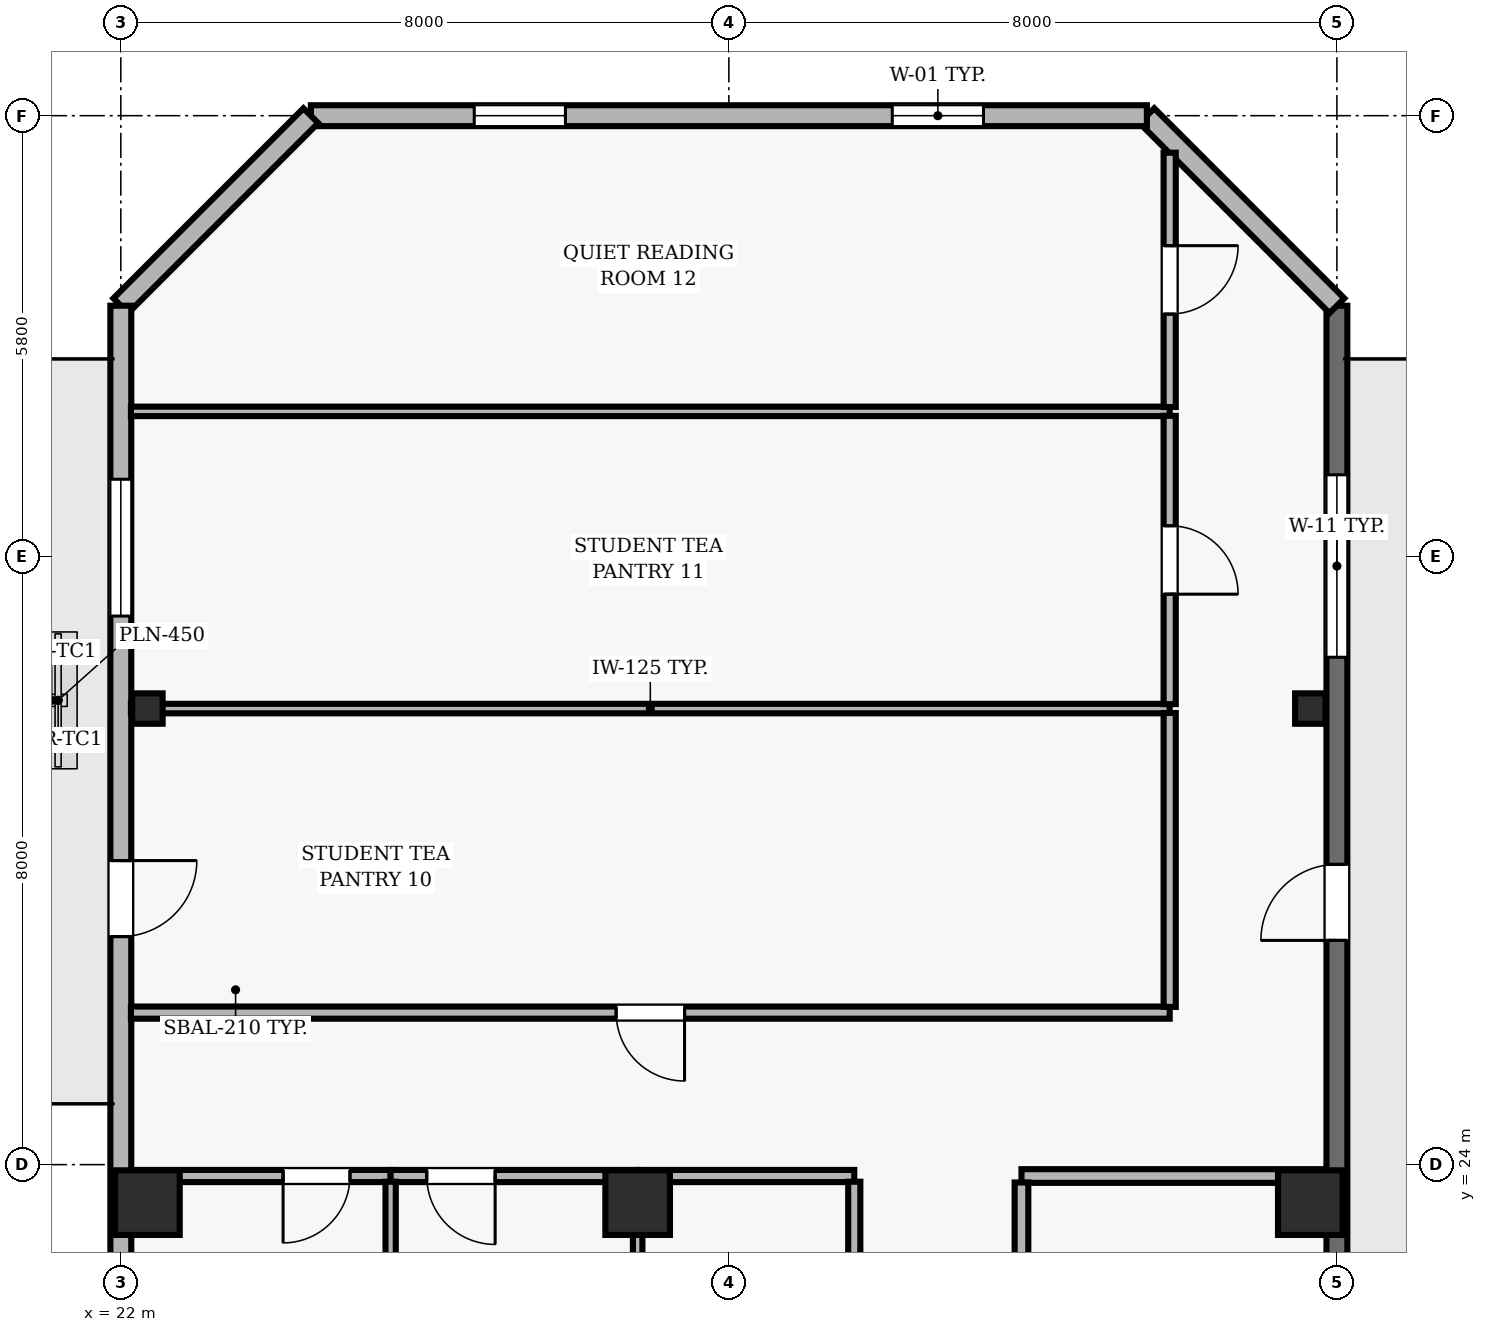
"""IFC4 building model, lengths in metres.
Left out: names, types, materials, properties, quantities, classifications, styles, units other than length and angle.
Written with IfcOpenShell. Run it as: python <this file> out.ifc"""

import sys

from ifc_helpers import new_model, si_unit, direction, frame, frame_2d, origin, origin_2d, place, context, subcontext, project, spatial, rectangle, hollow_rectangle, extrude, element, fill, save


model = new_model("IFC4")
c1 = context("Model", 3, precision=1e-05, world=origin(), true_north=direction((0.0, 1.0)))
c2 = subcontext(c1, "Body", "Model", "MODEL_VIEW")
j1 = project(units=[si_unit("LENGTHUNIT", "METRE"), si_unit("PLANEANGLEUNIT", "RADIAN")], contexts=[c1])
p1 = place(None, origin())
s1 = spatial("IfcSite", under=j1, at=p1, CompositionType="ELEMENT")
p2 = place(p1, origin())
s2 = spatial("IfcBuilding", under=s1, at=p2, CompositionType="ELEMENT")
p3 = place(p2, frame((0.0, 0.0, 302.8)))
s3 = spatial("IfcBuildingStorey", under=s2, at=p3, CompositionType="ELEMENT", Elevation=302.8)
for number, where, z_axis, x_axis in (
    (1, (22.35, 23.5, 0.0), (0.0, 0.0, 1.0), (1.0, 0.0, 0.0)),
    (2, (28.8, 23.5, 0.0), (0.0, 0.0, 1.0), (1.0, 0.0, 0.0)),
    (3, (37.65, 23.5, 0.0), (0.0, 0.0, 1.0), (1.0, 0.0, 0.0)),
):
    element("IfcColumn", number, at=place(p3, frame(where, z_axis=z_axis, x_axis=x_axis)), inside=s3, PredefinedType="COLUMN", context=c2, shape_type="SweptSolid", body=[
        extrude(rectangle(XDim=0.85, YDim=0.85, at=origin_2d()), origin(), (0.0, 0.0, 1.0), 3.9),
    ])
for number, where, z_axis, x_axis in (
    (4, (22.35, 30.0, 0.0), (0.0, 0.0, 1.0), (1.0, 0.0, 0.0)),
    (5, (37.65, 30.0, 0.0), (0.0, 0.0, 1.0), (1.0, 0.0, 0.0)),
):
    element("IfcColumn", number, at=place(p3, frame(where, z_axis=z_axis, x_axis=x_axis)), inside=s3, PredefinedType="COLUMN", context=c2, shape_type="SweptSolid", body=[
        extrude(hollow_rectangle(XDim=0.4, YDim=0.4, WallThickness=0.02, at=origin_2d()), origin(), (0.0, 0.0, 1.0), 3.9),
    ])
p4 = place(p3, frame((38.0, 21.6, 0.0), z_axis=(0.0, 0.0, 1.0), x_axis=(0.0, 1.0, 0.0)))
e6 = element("IfcWall", 6, at=p4, inside=s3, PredefinedType="SOLIDWALL", context=c2, shape_type="SweptSolid", body=[
    extrude(rectangle(XDim=13.7, YDim=0.275, at=frame_2d((6.85, 0.0))), origin(), (0.0, 0.0, 1.0), 3.64),
])
p5 = place(p4, frame((5.35, 0.0, 0.0)))
e7 = element("IfcOpeningElement", 7, at=p5, cuts=e6, PredefinedType="OPENING", context=c2, shape_type="SweptSolid", body=[
    extrude(rectangle(XDim=1.0, YDim=2.2, at=frame_2d((0.5, 1.1))), frame((0.0, 0.147, 0.0), z_axis=(0.0, -1.0, 0.0), x_axis=(1.0, 0.0, 0.0)), (0.0, 0.0, 1.0), 0.295),
])
p6 = place(p4, frame((9.075, 0.0, 0.9)))
e8 = element("IfcOpeningElement", 8, at=p6, cuts=e6, PredefinedType="OPENING", context=c2, shape_type="SweptSolid", body=[
    extrude(rectangle(XDim=2.4, YDim=2.2, at=frame_2d((1.2, 1.1))), frame((0.0, 0.147, 0.0), z_axis=(0.0, -1.0, 0.0), x_axis=(1.0, 0.0, 0.0)), (0.0, 0.0, 1.0), 0.295),
])
p7 = place(p3, frame((38.0, 35.3, 0.0), z_axis=(0.0, 0.0, 1.0), x_axis=(-0.707106781187, 0.707106781187, 0.0)))
e9 = element("IfcWall", 9, at=p7, inside=s3, PredefinedType="SOLIDWALL", context=c2, shape_type="SweptSolid", body=[
    extrude(rectangle(XDim=3.536, YDim=0.275, at=frame_2d((1.768, 0.0))), origin(), (0.0, 0.0, 1.0), 3.64),
])
p8 = place(p3, frame((35.5, 37.8, 0.0), z_axis=(0.0, 0.0, 1.0), x_axis=(-1.0, 0.0, 0.0)))
e10 = element("IfcWall", 10, at=p8, inside=s3, PredefinedType="SOLIDWALL", context=c2, shape_type="SweptSolid", body=[
    extrude(rectangle(XDim=11.0, YDim=0.275, at=frame_2d((5.5, 0.0))), origin(), (0.0, 0.0, 1.0), 3.64),
])
p9 = place(p8, frame((2.15, 0.0, 0.9)))
e11 = element("IfcOpeningElement", 11, at=p9, cuts=e10, PredefinedType="OPENING", context=c2, shape_type="SweptSolid", body=[
    extrude(rectangle(XDim=1.2, YDim=1.6, at=frame_2d((0.6, 0.8))), frame((0.0, 0.147, 0.0), z_axis=(0.0, -1.0, 0.0), x_axis=(1.0, 0.0, 0.0)), (0.0, 0.0, 1.0), 0.295),
])
p10 = place(p8, frame((7.65, 0.0, 0.9)))
e12 = element("IfcOpeningElement", 12, at=p10, cuts=e10, PredefinedType="OPENING", context=c2, shape_type="SweptSolid", body=[
    extrude(rectangle(XDim=1.2, YDim=1.6, at=frame_2d((0.6, 0.8))), frame((0.0, 0.147, 0.0), z_axis=(0.0, -1.0, 0.0), x_axis=(1.0, 0.0, 0.0)), (0.0, 0.0, 1.0), 0.295),
])
p11 = place(p3, frame((24.5, 37.8, 0.0), z_axis=(0.0, 0.0, 1.0), x_axis=(-0.707106781187, -0.707106781187, 0.0)))
e13 = element("IfcWall", 13, at=p11, inside=s3, PredefinedType="SOLIDWALL", context=c2, shape_type="SweptSolid", body=[
    extrude(rectangle(XDim=3.536, YDim=0.275, at=frame_2d((1.768, 0.0))), origin(), (0.0, 0.0, 1.0), 3.64),
])
p12 = place(p3, frame((22.0, 35.3, 0.0), z_axis=(0.0, 0.0, 1.0), x_axis=(0.0, -1.0, 0.0)))
e14 = element("IfcWall", 14, at=p12, inside=s3, PredefinedType="SOLIDWALL", context=c2, shape_type="SweptSolid", body=[
    extrude(rectangle(XDim=32.8, YDim=0.275, at=frame_2d((16.4, 0.0))), origin(), (0.0, 0.0, 1.0), 3.64),
])
p13 = place(p12, frame((7.3, 0.0, 0.0)))
e15 = element("IfcOpeningElement", 15, at=p13, cuts=e14, PredefinedType="OPENING", context=c2, shape_type="SweptSolid", body=[
    extrude(rectangle(XDim=1.0, YDim=2.2, at=frame_2d((0.5, 1.1))), frame((0.0, 0.147, 0.0), z_axis=(0.0, -1.0, 0.0), x_axis=(1.0, 0.0, 0.0)), (0.0, 0.0, 1.0), 0.295),
])
p14 = place(p12, frame((2.283, 0.0, 0.9)))
e16 = element("IfcOpeningElement", 16, at=p14, cuts=e14, PredefinedType="OPENING", context=c2, shape_type="SweptSolid", body=[
    extrude(rectangle(XDim=1.8, YDim=1.6, at=frame_2d((0.9, 0.8))), frame((0.0, 0.147, 0.0), z_axis=(0.0, -1.0, 0.0), x_axis=(1.0, 0.0, 0.0)), (0.0, 0.0, 1.0), 0.295),
])
p15 = place(p12, frame((12.767, 0.0, 0.9)))
e17 = element("IfcOpeningElement", 17, at=p15, cuts=e14, PredefinedType="OPENING", context=c2, shape_type="SweptSolid", body=[
    extrude(rectangle(XDim=1.8, YDim=1.6, at=frame_2d((0.9, 0.8))), frame((0.0, 0.147, 0.0), z_axis=(0.0, -1.0, 0.0), x_axis=(1.0, 0.0, 0.0)), (0.0, 0.0, 1.0), 0.295),
])
p16 = place(p12, frame((18.233, 0.0, 0.9)))
e18 = element("IfcOpeningElement", 18, at=p16, cuts=e14, PredefinedType="OPENING", context=c2, shape_type="SweptSolid", body=[
    extrude(rectangle(XDim=1.8, YDim=1.6, at=frame_2d((0.9, 0.8))), frame((0.0, 0.147, 0.0), z_axis=(0.0, -1.0, 0.0), x_axis=(1.0, 0.0, 0.0)), (0.0, 0.0, 1.0), 0.295),
])
p17 = place(p12, frame((23.7, 0.0, 0.9)))
e19 = element("IfcOpeningElement", 19, at=p17, cuts=e14, PredefinedType="OPENING", context=c2, shape_type="SweptSolid", body=[
    extrude(rectangle(XDim=1.8, YDim=1.6, at=frame_2d((0.9, 0.8))), frame((0.0, 0.147, 0.0), z_axis=(0.0, -1.0, 0.0), x_axis=(1.0, 0.0, 0.0)), (0.0, 0.0, 1.0), 0.295),
])
p18 = place(p3, frame((25.55, 23.85, 0.0), z_axis=(0.0, 0.0, 1.0), x_axis=(-1.0, 0.0, 0.0)))
e20 = element("IfcWall", 20, at=p18, inside=s3, PredefinedType="PARTITIONING", context=c2, shape_type="SweptSolid", body=[
    extrude(rectangle(XDim=3.35, YDim=0.16, at=frame_2d((1.675, 0.0))), origin(), (0.0, 0.0, 1.0), 3.171),
])
p19 = place(p18, frame((0.535, 0.0, 0.0)))
e21 = element("IfcOpeningElement", 21, at=p19, cuts=e20, PredefinedType="OPENING", context=c2, shape_type="SweptSolid", body=[
    extrude(rectangle(XDim=0.88, YDim=2.1, at=frame_2d((0.44, 1.05))), frame((0.0, 0.09, 0.0), z_axis=(0.0, -1.0, 0.0), x_axis=(1.0, 0.0, 0.0)), (0.0, 0.0, 1.0), 0.18),
])
p20 = place(p3, frame((28.8, 23.85, 0.0), z_axis=(0.0, 0.0, 1.0), x_axis=(-1.0, 0.0, 0.0)))
e22 = element("IfcWall", 22, at=p20, inside=s3, PredefinedType="PARTITIONING", context=c2, shape_type="SweptSolid", body=[
    extrude(rectangle(XDim=3.25, YDim=0.16, at=frame_2d((1.625, 0.0))), origin(), (0.0, 0.0, 1.0), 3.171),
])
p21 = place(p20, frame((1.875, 0.0, 0.0)))
e23 = element("IfcOpeningElement", 23, at=p21, cuts=e22, PredefinedType="OPENING", context=c2, shape_type="SweptSolid", body=[
    extrude(rectangle(XDim=0.9, YDim=2.1, at=frame_2d((0.45, 1.05))), frame((0.0, 0.09, 0.0), z_axis=(0.0, -1.0, 0.0), x_axis=(1.0, 0.0, 0.0)), (0.0, 0.0, 1.0), 0.18),
])
p22 = place(p3, frame((31.65, 23.85, 0.0), z_axis=(0.0, 0.0, 1.0), x_axis=(-1.0, 0.0, 0.0)))
e24 = element("IfcWall", 24, at=p22, inside=s3, PredefinedType="PARTITIONING", context=c2, shape_type="SweptSolid", body=[
    extrude(rectangle(XDim=2.85, YDim=0.16, at=frame_2d((1.425, 0.0))), origin(), (0.0, 0.0, 1.0), 3.171),
])
p23 = place(p3, frame((35.8, 26.0, 0.0), z_axis=(0.0, 0.0, 1.0), x_axis=(-1.0, 0.0, 0.0)))
e25 = element("IfcWall", 25, at=p23, inside=s3, PredefinedType="PARTITIONING", context=c2, shape_type="SweptSolid", body=[
    extrude(rectangle(XDim=13.667, YDim=0.16, at=frame_2d((6.833, 0.0))), origin(), (0.0, 0.0, 1.0), 3.64),
])
p24 = place(p23, frame((6.383, 0.0, 0.0)))
e26 = element("IfcOpeningElement", 26, at=p24, cuts=e25, PredefinedType="OPENING", context=c2, shape_type="SweptSolid", body=[
    extrude(rectangle(XDim=0.9, YDim=2.1, at=frame_2d((0.45, 1.05))), frame((0.0, 0.09, 0.0), z_axis=(0.0, -1.0, 0.0), x_axis=(1.0, 0.0, 0.0)), (0.0, 0.0, 1.0), 0.18),
])
p25 = place(p3, frame((35.8, 30.0, 0.0), z_axis=(0.0, 0.0, 1.0), x_axis=(-1.0, 0.0, 0.0)))
e27 = element("IfcWall", 27, at=p25, inside=s3, PredefinedType="PARTITIONING", context=c2, shape_type="SweptSolid", body=[
    extrude(rectangle(XDim=13.667, YDim=0.125, at=frame_2d((6.833, 0.0))), origin(), (0.0, 0.0, 1.0), 3.171),
])
p26 = place(p3, frame((35.8, 33.91, 0.0), z_axis=(0.0, 0.0, 1.0), x_axis=(-1.0, 0.0, 0.0)))
e28 = element("IfcWall", 28, at=p26, inside=s3, PredefinedType="PARTITIONING", context=c2, shape_type="SweptSolid", body=[
    extrude(rectangle(XDim=13.667, YDim=0.125, at=frame_2d((6.833, 0.0))), origin(), (0.0, 0.0, 1.0), 3.64),
])
p27 = place(p3, frame((37.85, 23.85, 0.0), z_axis=(0.0, 0.0, 1.0), x_axis=(-1.0, 0.0, 0.0)))
e29 = element("IfcWall", 29, at=p27, inside=s3, PredefinedType="PARTITIONING", context=c2, shape_type="SweptSolid", body=[
    extrude(rectangle(XDim=4.0, YDim=0.18, at=frame_2d((2.0, 0.0))), origin(), (0.0, 0.0, 1.0), 3.171),
])
p28 = place(p3, frame((25.55, 19.16, 0.0), z_axis=(0.0, 0.0, 1.0), x_axis=(0.0, 1.0, 0.0)))
e30 = element("IfcWall", 30, at=p28, inside=s3, PredefinedType="PARTITIONING", context=c2, shape_type="SweptSolid", body=[
    extrude(rectangle(XDim=4.615, YDim=0.135, at=frame_2d((2.308, 0.0))), origin(), (0.0, 0.0, 1.0), 3.64),
])
p29 = place(p3, frame((28.8, 23.775, 0.0), z_axis=(0.0, 0.0, 1.0), x_axis=(0.0, -1.0, 0.0)))
e31 = element("IfcWall", 31, at=p29, inside=s3, PredefinedType="PARTITIONING", context=c2, shape_type="SweptSolid", body=[
    extrude(rectangle(XDim=4.615, YDim=0.125, at=frame_2d((2.308, 0.0))), origin(), (0.0, 0.0, 1.0), 3.64),
])
p30 = place(p3, frame((31.65, 19.01, 0.0), z_axis=(0.0, 0.0, 1.0), x_axis=(0.0, 1.0, 0.0)))
e32 = element("IfcWall", 32, at=p30, inside=s3, PredefinedType="PARTITIONING", context=c2, shape_type="SweptSolid", body=[
    extrude(rectangle(XDim=4.765, YDim=0.16, at=frame_2d((2.382, 0.0))), origin(), (0.0, 0.0, 1.0), 3.64),
])
p31 = place(p30, frame((1.932, 0.0, 0.0)))
e33 = element("IfcOpeningElement", 33, at=p31, cuts=e32, PredefinedType="OPENING", context=c2, shape_type="SweptSolid", body=[
    extrude(rectangle(XDim=0.9, YDim=2.1, at=frame_2d((0.45, 1.05))), frame((0.0, 0.09, 0.0), z_axis=(0.0, -1.0, 0.0), x_axis=(1.0, 0.0, 0.0)), (0.0, 0.0, 1.0), 0.18),
])
p32 = place(p3, frame((33.85, 17.735, 0.0), z_axis=(0.0, 0.0, 1.0), x_axis=(0.0, 1.0, 0.0)))
e34 = element("IfcWall", 34, at=p32, inside=s3, PredefinedType="PARTITIONING", context=c2, shape_type="SweptSolid", body=[
    extrude(rectangle(XDim=6.03, YDim=0.18, at=frame_2d((3.015, 0.0))), origin(), (0.0, 0.0, 1.0), 3.64),
])
p33 = place(p32, frame((2.54, 0.0, 0.0)))
e35 = element("IfcOpeningElement", 35, at=p33, cuts=e34, PredefinedType="OPENING", context=c2, shape_type="SweptSolid", body=[
    extrude(rectangle(XDim=0.95, YDim=2.1, at=frame_2d((0.475, 1.05))), frame((0.0, 0.1, 0.0), z_axis=(0.0, -1.0, 0.0), x_axis=(1.0, 0.0, 0.0)), (0.0, 0.0, 1.0), 0.2),
])
p34 = place(p3, frame((35.8, 29.942, 0.0), z_axis=(0.0, 0.0, 1.0), x_axis=(0.0, -1.0, 0.0)))
e36 = element("IfcWall", 36, at=p34, inside=s3, PredefinedType="PARTITIONING", context=c2, shape_type="SweptSolid", body=[
    extrude(rectangle(XDim=3.867, YDim=0.16, at=frame_2d((1.934, 0.0))), origin(), (0.0, 0.0, 1.0), 3.64),
])
p35 = place(p3, frame((35.8, 33.852, 0.0), z_axis=(0.0, 0.0, 1.0), x_axis=(0.0, -1.0, 0.0)))
e37 = element("IfcWall", 37, at=p35, inside=s3, PredefinedType="PARTITIONING", context=c2, shape_type="SweptSolid", body=[
    extrude(rectangle(XDim=3.794, YDim=0.16, at=frame_2d((1.897, 0.0))), origin(), (0.0, 0.0, 1.0), 3.64),
])
p36 = place(p35, frame((1.447, 0.0, 0.0)))
e38 = element("IfcOpeningElement", 38, at=p36, cuts=e37, PredefinedType="OPENING", context=c2, shape_type="SweptSolid", body=[
    extrude(rectangle(XDim=0.9, YDim=2.1, at=frame_2d((0.45, 1.05))), frame((0.0, 0.09, 0.0), z_axis=(0.0, -1.0, 0.0), x_axis=(1.0, 0.0, 0.0)), (0.0, 0.0, 1.0), 0.18),
])
p37 = place(p3, frame((35.8, 37.313, 0.0), z_axis=(0.0, 0.0, 1.0), x_axis=(0.0, -1.0, 0.0)))
e39 = element("IfcWall", 39, at=p37, inside=s3, PredefinedType="PARTITIONING", context=c2, shape_type="SweptSolid", body=[
    extrude(rectangle(XDim=3.346, YDim=0.16, at=frame_2d((1.673, 0.0))), origin(), (0.0, 0.0, 1.0), 3.64),
])
p38 = place(p37, frame((1.223, 0.0, 0.0)))
e40 = element("IfcOpeningElement", 40, at=p38, cuts=e39, PredefinedType="OPENING", context=c2, shape_type="SweptSolid", body=[
    extrude(rectangle(XDim=0.9, YDim=2.1, at=frame_2d((0.45, 1.05))), frame((0.0, 0.09, 0.0), z_axis=(0.0, -1.0, 0.0), x_axis=(1.0, 0.0, 0.0)), (0.0, 0.0, 1.0), 0.18),
])
p39 = place(p5, origin())
e41 = element("IfcDoor", 41, at=p39, inside=s3, OperationType="SINGLE_SWING_LEFT", PredefinedType="DOOR", context=c2, shape_type="SweptSolid", body=[
    extrude(rectangle(XDim=1.0, YDim=2.2, at=frame_2d((0.5, 1.1))), frame((0.0, 0.025, 0.0), z_axis=(0.0, -1.0, 0.0), x_axis=(1.0, 0.0, 0.0)), (0.0, 0.0, 1.0), 0.05),
])
fill(e7, e41)
p40 = place(p6, origin())
e42 = element("IfcWindow", 42, at=p40, inside=s3, PartitioningType="SINGLE_PANEL", PredefinedType="WINDOW", context=c2, shape_type="SweptSolid", body=[
    extrude(rectangle(XDim=2.4, YDim=2.2, at=frame_2d((1.2, 1.1))), frame((0.0, 0.03, 0.0), z_axis=(0.0, -1.0, 0.0), x_axis=(1.0, 0.0, 0.0)), (0.0, 0.0, 1.0), 0.06),
])
fill(e8, e42)
p41 = place(p9, origin())
e43 = element("IfcWindow", 43, at=p41, inside=s3, PartitioningType="SINGLE_PANEL", PredefinedType="WINDOW", context=c2, shape_type="SweptSolid", body=[
    extrude(rectangle(XDim=1.2, YDim=1.6, at=frame_2d((0.6, 0.8))), frame((0.0, 0.03, 0.0), z_axis=(0.0, -1.0, 0.0), x_axis=(1.0, 0.0, 0.0)), (0.0, 0.0, 1.0), 0.06),
])
fill(e11, e43)
p42 = place(p10, origin())
e44 = element("IfcWindow", 44, at=p42, inside=s3, PartitioningType="SINGLE_PANEL", PredefinedType="WINDOW", context=c2, shape_type="SweptSolid", body=[
    extrude(rectangle(XDim=1.2, YDim=1.6, at=frame_2d((0.6, 0.8))), frame((0.0, 0.03, 0.0), z_axis=(0.0, -1.0, 0.0), x_axis=(1.0, 0.0, 0.0)), (0.0, 0.0, 1.0), 0.06),
])
fill(e12, e44)
p43 = place(p13, origin())
e45 = element("IfcDoor", 45, at=p43, inside=s3, OperationType="SINGLE_SWING_LEFT", PredefinedType="DOOR", context=c2, shape_type="SweptSolid", body=[
    extrude(rectangle(XDim=1.0, YDim=2.2, at=frame_2d((0.5, 1.1))), frame((0.0, 0.025, 0.0), z_axis=(0.0, -1.0, 0.0), x_axis=(1.0, 0.0, 0.0)), (0.0, 0.0, 1.0), 0.05),
])
fill(e15, e45)
p44 = place(p14, origin())
e46 = element("IfcWindow", 46, at=p44, inside=s3, PartitioningType="SINGLE_PANEL", PredefinedType="WINDOW", context=c2, shape_type="SweptSolid", body=[
    extrude(rectangle(XDim=1.8, YDim=1.6, at=frame_2d((0.9, 0.8))), frame((0.0, 0.03, 0.0), z_axis=(0.0, -1.0, 0.0), x_axis=(1.0, 0.0, 0.0)), (0.0, 0.0, 1.0), 0.06),
])
fill(e16, e46)
p45 = place(p19, origin())
e47 = element("IfcDoor", 47, at=p45, inside=s3, OperationType="SINGLE_SWING_RIGHT", PredefinedType="DOOR", context=c2, shape_type="SweptSolid", body=[
    extrude(rectangle(XDim=0.88, YDim=2.1, at=frame_2d((0.44, 1.05))), frame((0.0, 0.025, 0.0), z_axis=(0.0, -1.0, 0.0), x_axis=(1.0, 0.0, 0.0)), (0.0, 0.0, 1.0), 0.05),
])
fill(e21, e47)
p46 = place(p21, origin())
e48 = element("IfcDoor", 48, at=p46, inside=s3, OperationType="SINGLE_SWING_LEFT", PredefinedType="DOOR", context=c2, shape_type="SweptSolid", body=[
    extrude(rectangle(XDim=0.9, YDim=2.1, at=frame_2d((0.45, 1.05))), frame((0.0, 0.025, 0.0), z_axis=(0.0, -1.0, 0.0), x_axis=(1.0, 0.0, 0.0)), (0.0, 0.0, 1.0), 0.05),
])
fill(e23, e48)
p47 = place(p24, origin())
e49 = element("IfcDoor", 49, at=p47, inside=s3, OperationType="SINGLE_SWING_LEFT", PredefinedType="DOOR", context=c2, shape_type="SweptSolid", body=[
    extrude(rectangle(XDim=0.9, YDim=2.1, at=frame_2d((0.45, 1.05))), frame((0.0, 0.025, 0.0), z_axis=(0.0, -1.0, 0.0), x_axis=(1.0, 0.0, 0.0)), (0.0, 0.0, 1.0), 0.05),
])
fill(e26, e49)
p48 = place(p36, origin())
e50 = element("IfcDoor", 50, at=p48, inside=s3, OperationType="SINGLE_SWING_RIGHT", PredefinedType="DOOR", context=c2, shape_type="SweptSolid", body=[
    extrude(rectangle(XDim=0.9, YDim=2.1, at=frame_2d((0.45, 1.05))), frame((0.0, 0.025, 0.0), z_axis=(0.0, -1.0, 0.0), x_axis=(1.0, 0.0, 0.0)), (0.0, 0.0, 1.0), 0.05),
])
fill(e38, e50)
p49 = place(p38, origin())
e51 = element("IfcDoor", 51, at=p49, inside=s3, OperationType="SINGLE_SWING_LEFT", PredefinedType="DOOR", context=c2, shape_type="SweptSolid", body=[
    extrude(rectangle(XDim=0.9, YDim=2.1, at=frame_2d((0.45, 1.05))), frame((0.0, 0.025, 0.0), z_axis=(0.0, -1.0, 0.0), x_axis=(1.0, 0.0, 0.0)), (0.0, 0.0, 1.0), 0.05),
])
fill(e40, e51)
save(model, sys.argv[1])
